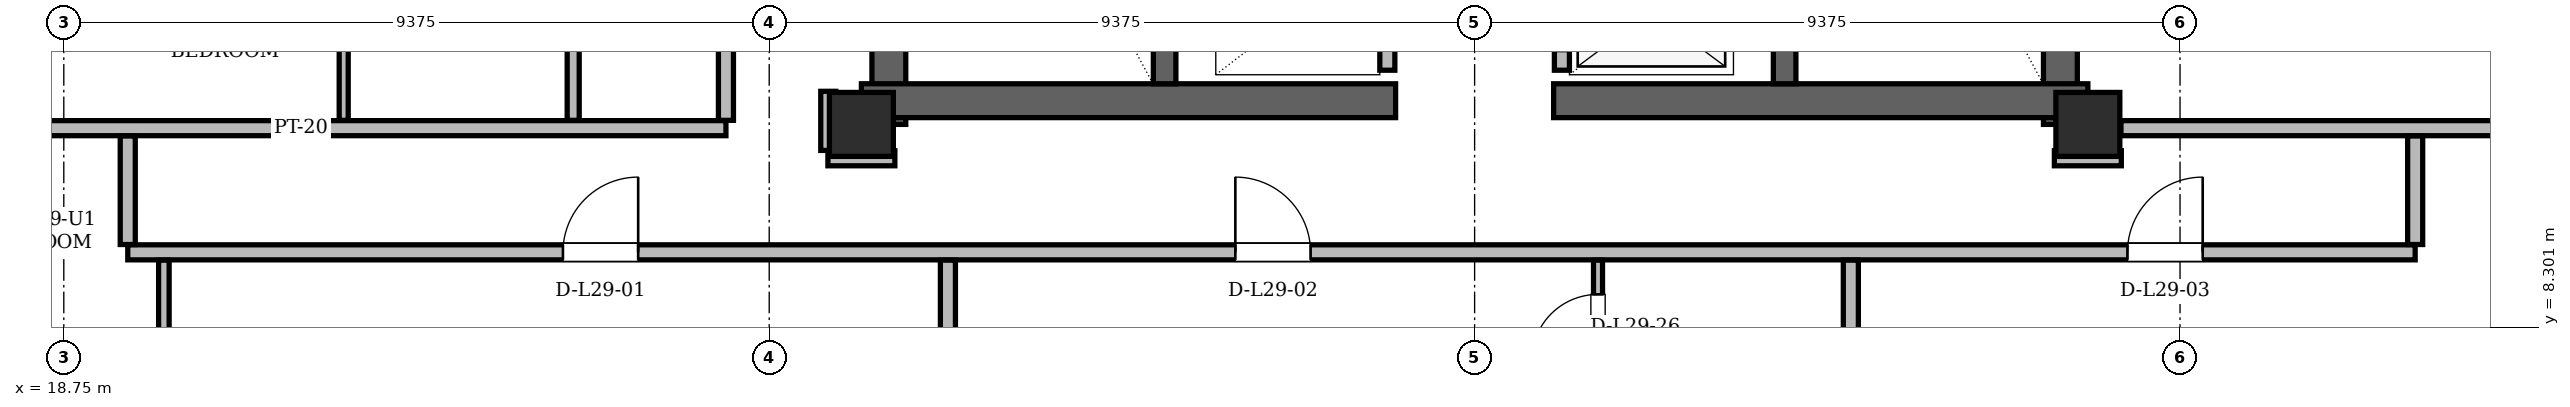
"""IFC4 building model, lengths in metres.
Left out: names, types, materials, properties, quantities, classifications, styles, units other than length and angle.
Written with IfcOpenShell. Run it as: python <this file> out.ifc"""

import sys

from ifc_helpers import new_model, si_unit, direction, frame, frame_2d, origin, origin_2d, place, context, subcontext, project, spatial, rectangle, hollow_rectangle, extrude, element, fill, save


model = new_model("IFC4")
c1 = context("Model", 3, precision=1e-05, world=origin(), true_north=direction((0.0, 1.0)))
c2 = subcontext(c1, "Body", "Model", "MODEL_VIEW")
j1 = project(units=[si_unit("LENGTHUNIT", "METRE"), si_unit("PLANEANGLEUNIT", "RADIAN")], contexts=[c1])
p1 = place(None, origin())
s1 = spatial("IfcSite", under=j1, at=p1, CompositionType="ELEMENT")
p2 = place(p1, origin())
s2 = spatial("IfcBuilding", under=s1, at=p2, CompositionType="ELEMENT")
p3 = place(p2, frame((0.0, 0.0, 112.2)))
s3 = spatial("IfcBuildingStorey", under=s2, at=p3, CompositionType="ELEMENT", Elevation=112.2)
for number, where, z_axis, x_axis in (
    (1, (29.35, 11.0, 0.0), (0.0, 0.0, 1.0), (1.0, 0.0, 0.0)),
    (2, (45.65, 11.0, 0.0), (0.0, 0.0, 1.0), (1.0, 0.0, 0.0)),
):
    element("IfcColumn", number, at=place(p3, frame(where, z_axis=z_axis, x_axis=x_axis)), inside=s3, PredefinedType="COLUMN", context=c2, shape_type="SweptSolid", body=[
        extrude(hollow_rectangle(XDim=0.85, YDim=0.85, WallThickness=0.07, at=origin_2d()), origin(), (0.0, 0.0, 1.0), 3.6),
    ])
for number, where, z_axis, x_axis in (
    (3, (29.715, 11.0, 0.0), (0.0, 0.0, 1.0), (0.0, 1.0, 0.0)),
    (4, (45.285, 11.0, 0.0), (0.0, 0.0, 1.0), (0.0, 1.0, 0.0)),
):
    element("IfcWall", number, at=place(p3, frame(where, z_axis=z_axis, x_axis=x_axis)), inside=s3, PredefinedType="SHEAR", context=c2, shape_type="SweptSolid", body=[
        extrude(rectangle(XDim=13.3, YDim=0.45, at=frame_2d((6.65, 0.0))), origin(), (0.0, 0.0, 1.0), 3.36),
    ])
for number, where, z_axis, x_axis in (
    (5, (29.35, 11.315, 0.0), (0.0, 0.0, 1.0), (1.0, 0.0, 0.0)),
    (6, (38.55, 11.315, 0.0), (0.0, 0.0, 1.0), (1.0, 0.0, 0.0)),
):
    element("IfcWall", number, at=place(p3, frame(where, z_axis=z_axis, x_axis=x_axis)), inside=s3, PredefinedType="SHEAR", context=c2, shape_type="SweptSolid", body=[
        extrude(rectangle(XDim=7.1, YDim=0.45, at=frame_2d((3.55, 0.0))), origin(), (0.0, 0.0, 1.0), 3.36),
    ])
for number, where, z_axis, x_axis in (
    (7, (33.38, 11.54, 0.0), (0.0, 0.0, 1.0), (0.0, 1.0, 0.0)),
    (8, (41.62, 11.54, 0.0), (0.0, 0.0, 1.0), (0.0, 1.0, 0.0)),
):
    element("IfcWall", number, at=place(p3, frame(where, z_axis=z_axis, x_axis=x_axis)), inside=s3, PredefinedType="SHEAR", context=c2, shape_type="SweptSolid", body=[
        extrude(rectangle(XDim=7.62, YDim=0.3, at=frame_2d((3.81, 0.0))), origin(), (0.0, 0.0, 1.0), 3.36),
    ])
p4 = place(p3, frame((14.475, 13.33, 0.0), z_axis=(0.0, 0.0, 1.0), x_axis=(0.500010476433, -0.866019355129, 0.0)))
e9 = element("IfcWall", 9, at=p4, inside=s3, PredefinedType="SOLIDWALL", context=c2, shape_type="SweptSolid", body=[
    extrude(rectangle(XDim=11.3, YDim=0.34, at=frame_2d((5.65, 0.0))), origin(), (0.0, 0.0, 1.0), 2.578),
])
p5 = place(p4, frame((2.744, 0.0, 0.85)))
e10 = element("IfcOpeningElement", 10, at=p5, cuts=e9, PredefinedType="OPENING", context=c2, shape_type="SweptSolid", body=[
    extrude(rectangle(XDim=1.2, YDim=1.48, at=frame_2d((0.6, 0.74))), frame((0.0, 0.17, 0.0), z_axis=(0.0, -1.0, 0.0), x_axis=(1.0, 0.0, 0.0)), (0.0, 0.0, 1.0), 0.34),
])
p6 = place(p3, frame((36.34, 11.72, 0.0), z_axis=(0.0, 0.0, 1.0), x_axis=(0.0, 1.0, 0.0)))
e11 = element("IfcWall", 11, at=p6, inside=s3, PredefinedType="PARTITIONING", context=c2, shape_type="SweptSolid", body=[
    extrude(rectangle(XDim=7.6, YDim=0.2, at=frame_2d((3.8, 0.0))), origin(), (0.0, 0.0, 1.0), 3.36),
])
p7 = place(p3, frame((38.66, 11.72, 0.0), z_axis=(0.0, 0.0, 1.0), x_axis=(0.0, 1.0, 0.0)))
e12 = element("IfcWall", 12, at=p7, inside=s3, PredefinedType="PARTITIONING", context=c2, shape_type="SweptSolid", body=[
    extrude(rectangle(XDim=9.1, YDim=0.2, at=frame_2d((4.55, 0.0))), origin(), (0.0, 0.0, 1.0), 3.36),
])
p8 = place(p7, frame((0.255, 0.0, 0.0)))
e13 = element("IfcOpeningElement", 13, at=p8, cuts=e12, PredefinedType="OPENING", context=c2, shape_type="SweptSolid", body=[
    extrude(rectangle(XDim=1.05, YDim=2.15, at=frame_2d((0.525, 1.075))), frame((0.0, 0.1, 0.0), z_axis=(0.0, -1.0, 0.0), x_axis=(1.0, 0.0, 0.0)), (0.0, 0.0, 1.0), 0.2),
])
p9 = place(p7, frame((2.105, 0.0, 0.0)))
e14 = element("IfcOpeningElement", 14, at=p9, cuts=e12, PredefinedType="OPENING", context=c2, shape_type="SweptSolid", body=[
    extrude(rectangle(XDim=1.05, YDim=2.15, at=frame_2d((0.525, 1.075))), frame((0.0, 0.1, 0.0), z_axis=(0.0, -1.0, 0.0), x_axis=(1.0, 0.0, 0.0)), (0.0, 0.0, 1.0), 0.2),
])
p10 = place(p7, frame((3.955, 0.0, 0.0)))
e15 = element("IfcOpeningElement", 15, at=p10, cuts=e12, PredefinedType="OPENING", context=c2, shape_type="SweptSolid", body=[
    extrude(rectangle(XDim=1.05, YDim=2.15, at=frame_2d((0.525, 1.075))), frame((0.0, 0.1, 0.0), z_axis=(0.0, -1.0, 0.0), x_axis=(1.0, 0.0, 0.0)), (0.0, 0.0, 1.0), 0.2),
])
p11 = place(p3, frame((19.6, 9.3, 0.0), z_axis=(0.0, 0.0, 1.0), x_axis=(1.0, 0.0, 0.0)))
e16 = element("IfcWall", 16, at=p11, inside=s3, PredefinedType="PARTITIONING", context=c2, shape_type="SweptSolid", body=[
    extrude(rectangle(XDim=30.4, YDim=0.2, at=frame_2d((15.2, 0.0))), origin(), (0.0, 0.0, 1.0), 2.814),
])
p12 = place(p11, frame((5.783, 0.0, 0.0)))
e17 = element("IfcOpeningElement", 17, at=p12, cuts=e16, PredefinedType="OPENING", context=c2, shape_type="SweptSolid", body=[
    extrude(rectangle(XDim=1.0, YDim=2.18, at=frame_2d((0.5, 1.09))), frame((0.0, 0.1, 0.0), z_axis=(0.0, -1.0, 0.0), x_axis=(1.0, 0.0, 0.0)), (0.0, 0.0, 1.0), 0.2),
])
p13 = place(p11, frame((14.72, 0.0, 0.0)))
e18 = element("IfcOpeningElement", 18, at=p13, cuts=e16, PredefinedType="OPENING", context=c2, shape_type="SweptSolid", body=[
    extrude(rectangle(XDim=1.0, YDim=2.18, at=frame_2d((0.5, 1.09))), frame((0.0, 0.1, 0.0), z_axis=(0.0, -1.0, 0.0), x_axis=(1.0, 0.0, 0.0)), (0.0, 0.0, 1.0), 0.2),
])
p14 = place(p11, frame((26.576, 0.0, 0.0)))
e19 = element("IfcOpeningElement", 19, at=p14, cuts=e16, PredefinedType="OPENING", context=c2, shape_type="SweptSolid", body=[
    extrude(rectangle(XDim=1.0, YDim=2.18, at=frame_2d((0.5, 1.09))), frame((0.0, 0.1, 0.0), z_axis=(0.0, -1.0, 0.0), x_axis=(1.0, 0.0, 0.0)), (0.0, 0.0, 1.0), 0.2),
])
for number, where, z_axis, x_axis in (
    (20, (28.905, 10.55, 0.0), (0.0, 0.0, 1.0), (1.0, 0.0, 0.0)),
    (21, (45.205, 10.55, 0.0), (0.0, 0.0, 1.0), (1.0, 0.0, 0.0)),
):
    element("IfcWall", number, at=place(p3, frame(where, z_axis=z_axis, x_axis=x_axis)), inside=s3, PredefinedType="PARTITIONING", context=c2, shape_type="SweptSolid", body=[
        extrude(rectangle(XDim=0.89, YDim=0.2, at=frame_2d((0.445, 0.0))), origin(), (0.0, 0.0, 1.0), 3.36),
    ])
p15 = place(p3, frame((16.05, 10.95, 0.0), z_axis=(0.0, 0.0, 1.0), x_axis=(1.0, 0.0, 0.0)))
e22 = element("IfcWall", 22, at=p15, inside=s3, PredefinedType="PARTITIONING", context=c2, shape_type="SweptSolid", body=[
    extrude(rectangle(XDim=11.5, YDim=0.2, at=frame_2d((5.75, 0.0))), origin(), (0.0, 0.0, 1.0), 3.36),
])
p16 = place(p3, frame((46.09, 10.95, 0.0), z_axis=(0.0, 0.0, 1.0), x_axis=(1.0, 0.0, 0.0)))
e23 = element("IfcWall", 23, at=p16, inside=s3, PredefinedType="PARTITIONING", context=c2, shape_type="SweptSolid", body=[
    extrude(rectangle(XDim=12.86, YDim=0.2, at=frame_2d((6.43, 0.0))), origin(), (0.0, 0.0, 1.0), 2.814),
])
p17 = place(p3, frame((19.6, 9.404, 0.0), z_axis=(0.0, 0.0, 1.0), x_axis=(0.0, 1.0, 0.0)))
e24 = element("IfcWall", 24, at=p17, inside=s3, PredefinedType="PARTITIONING", context=c2, shape_type="SweptSolid", body=[
    extrude(rectangle(XDim=1.442, YDim=0.2, at=frame_2d((0.721, 0.0))), origin(), (0.0, 0.0, 1.0), 3.36),
])
p18 = place(p3, frame((20.08, 3.97, 0.0), z_axis=(0.0, 0.0, 1.0), x_axis=(0.0, 1.0, 0.0)))
e25 = element("IfcWall", 25, at=p18, inside=s3, PredefinedType="PARTITIONING", context=c2, shape_type="SweptSolid", body=[
    extrude(rectangle(XDim=5.226, YDim=0.14, at=frame_2d((2.613, 0.0))), origin(), (0.0, 0.0, 1.0), 3.36),
])
p19 = place(p18, frame((2.201, 0.0, 0.0)))
e26 = element("IfcOpeningElement", 26, at=p19, cuts=e25, PredefinedType="OPENING", context=c2, shape_type="SweptSolid", body=[
    extrude(rectangle(XDim=0.88, YDim=2.08, at=frame_2d((0.44, 1.04))), frame((0.0, 0.07, 0.0), z_axis=(0.0, -1.0, 0.0), x_axis=(1.0, 0.0, 0.0)), (0.0, 0.0, 1.0), 0.14),
])
p20 = place(p3, frame((22.47, 11.054, 0.0), z_axis=(0.0, 0.0, 1.0), x_axis=(0.0, 1.0, 0.0)))
e27 = element("IfcWall", 27, at=p20, inside=s3, PredefinedType="PARTITIONING", context=c2, shape_type="SweptSolid", body=[
    extrude(rectangle(XDim=2.442, YDim=0.12, at=frame_2d((1.221, 0.0))), origin(), (0.0, 0.0, 1.0), 2.814),
])
p21 = place(p3, frame((25.52, 11.054, 0.0), z_axis=(0.0, 0.0, 1.0), x_axis=(0.0, 1.0, 0.0)))
e28 = element("IfcWall", 28, at=p21, inside=s3, PredefinedType="PARTITIONING", context=c2, shape_type="SweptSolid", body=[
    extrude(rectangle(XDim=2.442, YDim=0.16, at=frame_2d((1.221, 0.0))), origin(), (0.0, 0.0, 1.0), 2.814),
])
p22 = place(p3, frame((27.55, 11.054, 0.0), z_axis=(0.0, 0.0, 1.0), x_axis=(0.0, 1.0, 0.0)))
e29 = element("IfcWall", 29, at=p22, inside=s3, PredefinedType="PARTITIONING", context=c2, shape_type="SweptSolid", body=[
    extrude(rectangle(XDim=5.692, YDim=0.2, at=frame_2d((2.846, 0.0))), origin(), (0.0, 0.0, 1.0), 2.814),
])
p23 = place(p3, frame((28.91, 10.654, 0.0), z_axis=(0.0, 0.0, 1.0), x_axis=(0.0, 1.0, 0.0)))
e30 = element("IfcWall", 30, at=p23, inside=s3, PredefinedType="PARTITIONING", context=c2, shape_type="SweptSolid", body=[
    extrude(rectangle(XDim=0.786, YDim=0.2, at=frame_2d((0.393, 0.0))), origin(), (0.0, 0.0, 1.0), 2.814),
])
p24 = place(p3, frame((30.5, 3.804, 0.0), z_axis=(0.0, 0.0, 1.0), x_axis=(0.0, 1.0, 0.0)))
e31 = element("IfcWall", 31, at=p24, inside=s3, PredefinedType="PARTITIONING", context=c2, shape_type="SweptSolid", body=[
    extrude(rectangle(XDim=5.392, YDim=0.2, at=frame_2d((2.696, 0.0))), origin(), (0.0, 0.0, 1.0), 3.36),
])
p25 = place(p3, frame((39.14, 3.719, 0.0), z_axis=(0.0, 0.0, 1.0), x_axis=(0.0, 1.0, 0.0)))
e32 = element("IfcWall", 32, at=p25, inside=s3, PredefinedType="PARTITIONING", context=c2, shape_type="SweptSolid", body=[
    extrude(rectangle(XDim=5.477, YDim=0.12, at=frame_2d((2.739, 0.0))), origin(), (0.0, 0.0, 1.0), 3.36),
])
p26 = place(p25, frame((1.275, 0.0, 0.0)))
e33 = element("IfcOpeningElement", 33, at=p26, cuts=e32, PredefinedType="OPENING", context=c2, shape_type="SweptSolid", body=[
    extrude(rectangle(XDim=0.95, YDim=2.1, at=frame_2d((0.475, 1.05))), frame((0.0, 0.06, 0.0), z_axis=(0.0, -1.0, 0.0), x_axis=(1.0, 0.0, 0.0)), (0.0, 0.0, 1.0), 0.12),
])
p27 = place(p25, frame((4.143, 0.0, 0.0)))
e34 = element("IfcOpeningElement", 34, at=p27, cuts=e32, PredefinedType="OPENING", context=c2, shape_type="SweptSolid", body=[
    extrude(rectangle(XDim=0.88, YDim=2.08, at=frame_2d((0.44, 1.04))), frame((0.0, 0.06, 0.0), z_axis=(0.0, -1.0, 0.0), x_axis=(1.0, 0.0, 0.0)), (0.0, 0.0, 1.0), 0.12),
])
p28 = place(p3, frame((42.5, 3.719, 0.0), z_axis=(0.0, 0.0, 1.0), x_axis=(0.0, 1.0, 0.0)))
e35 = element("IfcWall", 35, at=p28, inside=s3, PredefinedType="PARTITIONING", context=c2, shape_type="SweptSolid", body=[
    extrude(rectangle(XDim=5.477, YDim=0.2, at=frame_2d((2.739, 0.0))), origin(), (0.0, 0.0, 1.0), 2.946),
])
p29 = place(p3, frame((50.0, 9.404, 0.0), z_axis=(0.0, 0.0, 1.0), x_axis=(0.0, 1.0, 0.0)))
e36 = element("IfcWall", 36, at=p29, inside=s3, PredefinedType="PARTITIONING", context=c2, shape_type="SweptSolid", body=[
    extrude(rectangle(XDim=1.442, YDim=0.2, at=frame_2d((0.721, 0.0))), origin(), (0.0, 0.0, 1.0), 3.36),
])
p30 = place(p12, origin())
e37 = element("IfcDoor", 37, at=p30, inside=s3, OperationType="SINGLE_SWING_RIGHT", PredefinedType="DOOR", context=c2, shape_type="SweptSolid", body=[
    extrude(rectangle(XDim=1.0, YDim=2.18, at=frame_2d((0.5, 1.09))), frame((0.0, 0.025, 0.0), z_axis=(0.0, -1.0, 0.0), x_axis=(1.0, 0.0, 0.0)), (0.0, 0.0, 1.0), 0.05),
])
fill(e17, e37)
p31 = place(p13, origin())
e38 = element("IfcDoor", 38, at=p31, inside=s3, OperationType="SINGLE_SWING_LEFT", PredefinedType="DOOR", context=c2, shape_type="SweptSolid", body=[
    extrude(rectangle(XDim=1.0, YDim=2.18, at=frame_2d((0.5, 1.09))), frame((0.0, 0.025, 0.0), z_axis=(0.0, -1.0, 0.0), x_axis=(1.0, 0.0, 0.0)), (0.0, 0.0, 1.0), 0.05),
])
fill(e18, e38)
p32 = place(p14, origin())
e39 = element("IfcDoor", 39, at=p32, inside=s3, OperationType="SINGLE_SWING_RIGHT", PredefinedType="DOOR", context=c2, shape_type="SweptSolid", body=[
    extrude(rectangle(XDim=1.0, YDim=2.18, at=frame_2d((0.5, 1.09))), frame((0.0, 0.025, 0.0), z_axis=(0.0, -1.0, 0.0), x_axis=(1.0, 0.0, 0.0)), (0.0, 0.0, 1.0), 0.05),
])
fill(e19, e39)
p33 = place(p27, origin())
e40 = element("IfcDoor", 40, at=p33, inside=s3, OperationType="SINGLE_SWING_LEFT", PredefinedType="DOOR", context=c2, shape_type="SweptSolid", body=[
    extrude(rectangle(XDim=0.88, YDim=2.08, at=frame_2d((0.44, 1.04))), frame((0.0, 0.025, 0.0), z_axis=(0.0, -1.0, 0.0), x_axis=(1.0, 0.0, 0.0)), (0.0, 0.0, 1.0), 0.05),
])
fill(e34, e40)
save(model, sys.argv[1])
